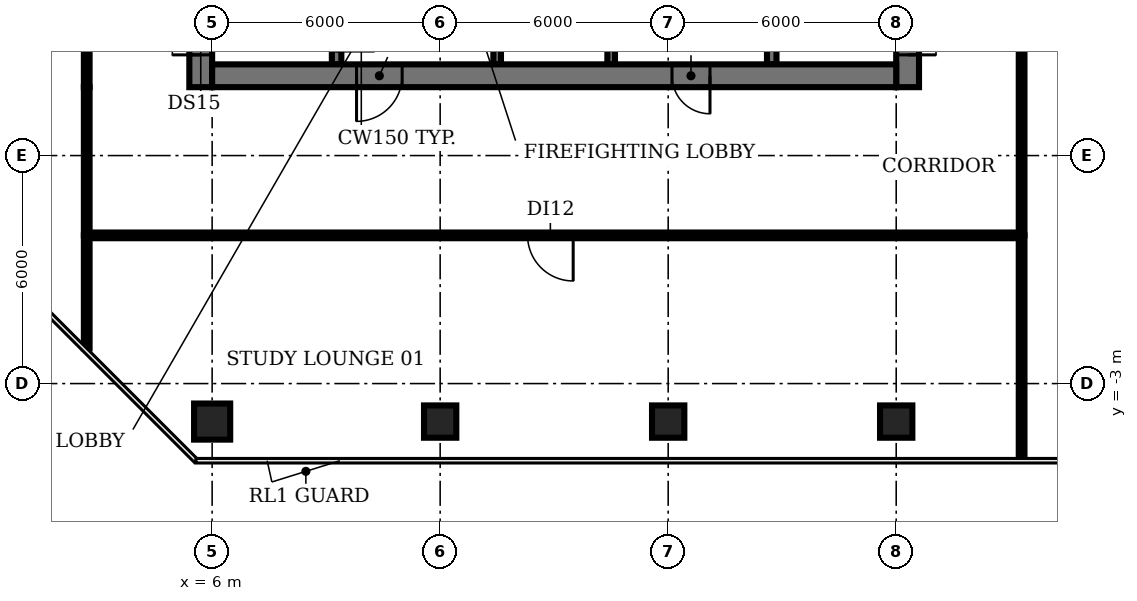
"""IFC4 building model, lengths in metres.
Left out: names, types, materials, properties, quantities, classifications, styles, units other than length and angle.
Written with IfcOpenShell. Run it as: python <this file> out.ifc"""

import sys

from ifc_helpers import new_model, si_unit, direction, frame, frame_2d, origin, origin_2d, place, context, subcontext, project, spatial, rectangle, circle, extrude, element, fill, save


model = new_model("IFC4")
c1 = context("Model", 3, precision=1e-05, world=origin(), true_north=direction((0.0, 1.0)))
c2 = subcontext(c1, "Body", "Model", "MODEL_VIEW")
j1 = project(units=[si_unit("LENGTHUNIT", "METRE"), si_unit("PLANEANGLEUNIT", "RADIAN")], contexts=[c1])
p1 = place(None, origin())
s1 = spatial("IfcSite", under=j1, at=p1, CompositionType="ELEMENT")
p2 = place(p1, origin())
s2 = spatial("IfcBuilding", under=s1, at=p2, CompositionType="ELEMENT")
p3 = place(p2, frame((0.0, 0.0, 184.4)))
s3 = spatial("IfcBuildingStorey", under=s2, at=p3, CompositionType="ELEMENT", Elevation=184.4)
p4 = place(p3, frame((6.0, -4.0, 0.0), z_axis=(0.0, 0.0, 1.0), x_axis=(1.0, 0.0, 0.0)))
e1 = element("IfcColumn", 1, at=p4, inside=s3, PredefinedType="COLUMN", context=c2, shape_type="SweptSolid", body=[
    extrude(circle(Radius=0.475, at=origin_2d()), origin(), (0.0, 0.0, 1.0), 3.85),
])
for number, where, z_axis, x_axis in (
    (2, (12.0, -4.0, 0.0), (0.0, 0.0, 1.0), (1.0, 0.0, 0.0)),
    (3, (18.0, -4.0, 0.0), (0.0, 0.0, 1.0), (1.0, 0.0, 0.0)),
    (4, (24.0, -4.0, 0.0), (0.0, 0.0, 1.0), (1.0, 0.0, 0.0)),
):
    element("IfcColumn", number, at=place(p3, frame(where, z_axis=z_axis, x_axis=x_axis)), inside=s3, PredefinedType="COLUMN", context=c2, shape_type="SweptSolid", body=[
        extrude(rectangle(XDim=0.85, YDim=0.85, at=origin_2d()), origin(), (0.0, 0.0, 1.0), 3.85),
    ])
p5 = place(p3, frame((9.275, 11.825, 0.0), z_axis=(0.0, 0.0, 1.0), x_axis=(0.0, -1.0, 0.0)))
e5 = element("IfcWall", 5, at=p5, inside=s3, PredefinedType="SHEAR", context=c2, shape_type="SweptSolid", body=[
    extrude(rectangle(XDim=6.425, YDim=0.25, at=frame_2d((3.212, 0.0))), origin(), (0.0, 0.0, 1.0), 3.85),
])
p6 = place(p5, frame((5.075, 0.0, 0.0)))
e6 = element("IfcOpeningElement", 6, at=p6, cuts=e5, PredefinedType="OPENING", context=c2, shape_type="SweptSolid", body=[
    extrude(rectangle(XDim=1.0, YDim=2.1, at=frame_2d((0.5, 1.05))), frame((0.0, 0.135, 0.0), z_axis=(0.0, -1.0, 0.0), x_axis=(1.0, 0.0, 0.0)), (0.0, 0.0, 1.0), 0.27),
])
p7 = place(p3, frame((13.5, 5.4, 0.0), z_axis=(0.0, 0.0, 1.0), x_axis=(0.0, 1.0, 0.0)))
e7 = element("IfcWall", 7, at=p7, inside=s3, PredefinedType="SHEAR", context=c2, shape_type="SweptSolid", body=[
    extrude(rectangle(XDim=8.2, YDim=0.2, at=frame_2d((4.1, 0.0))), origin(), (0.0, 0.0, 1.0), 3.85),
])
p8 = place(p7, frame((0.75, 0.0, 0.0)))
e8 = element("IfcOpeningElement", 8, at=p8, cuts=e7, PredefinedType="OPENING", context=c2, shape_type="SweptSolid", body=[
    extrude(rectangle(XDim=1.1, YDim=2.1, at=frame_2d((0.55, 1.05))), frame((0.0, 0.11, 0.0), z_axis=(0.0, -1.0, 0.0), x_axis=(1.0, 0.0, 0.0)), (0.0, 0.0, 1.0), 0.22),
])
p9 = place(p7, frame((3.55, 0.0, 0.0)))
e9 = element("IfcOpeningElement", 9, at=p9, cuts=e7, PredefinedType="OPENING", context=c2, shape_type="SweptSolid", body=[
    extrude(rectangle(XDim=1.1, YDim=2.1, at=frame_2d((0.55, 1.05))), frame((0.0, 0.11, 0.0), z_axis=(0.0, -1.0, 0.0), x_axis=(1.0, 0.0, 0.0)), (0.0, 0.0, 1.0), 0.22),
])
p10 = place(p7, frame((6.35, 0.0, 0.0)))
e10 = element("IfcOpeningElement", 10, at=p10, cuts=e7, PredefinedType="OPENING", context=c2, shape_type="SweptSolid", body=[
    extrude(rectangle(XDim=1.1, YDim=2.1, at=frame_2d((0.55, 1.05))), frame((0.0, 0.11, 0.0), z_axis=(0.0, -1.0, 0.0), x_axis=(1.0, 0.0, 0.0)), (0.0, 0.0, 1.0), 0.22),
])
p11 = place(p3, frame((16.5, 5.4, 0.0), z_axis=(0.0, 0.0, 1.0), x_axis=(0.0, 1.0, 0.0)))
e11 = element("IfcWall", 11, at=p11, inside=s3, PredefinedType="SHEAR", context=c2, shape_type="SweptSolid", body=[
    extrude(rectangle(XDim=8.2, YDim=0.2, at=frame_2d((4.1, 0.0))), origin(), (0.0, 0.0, 1.0), 3.85),
])
p12 = place(p3, frame((20.725, 5.4, 0.0), z_axis=(0.0, 0.0, 1.0), x_axis=(0.0, 1.0, 0.0)))
e12 = element("IfcWall", 12, at=p12, inside=s3, PredefinedType="SHEAR", context=c2, shape_type="SweptSolid", body=[
    extrude(rectangle(XDim=6.3, YDim=0.25, at=frame_2d((3.15, 0.0))), origin(), (0.0, 0.0, 1.0), 3.85),
])
p13 = place(p3, frame((5.7, 4.8, 0.0), z_axis=(0.0, 0.0, 1.0), x_axis=(0.0, 1.0, 0.0)))
e13 = element("IfcWall", 13, at=p13, inside=s3, PredefinedType="SHEAR", context=c2, shape_type="SweptSolid", body=[
    extrude(rectangle(XDim=20.6, YDim=0.6, at=frame_2d((10.3, 0.0))), origin(), (0.0, 0.0, 1.0), 3.85),
])
p14 = place(p13, frame((0.85, 0.0, 0.0)))
e14 = element("IfcOpeningElement", 14, at=p14, cuts=e13, PredefinedType="OPENING", context=c2, shape_type="SweptSolid", body=[
    extrude(rectangle(XDim=1.5, YDim=2.1, at=frame_2d((0.75, 1.05))), frame((0.0, 0.31, 0.0), z_axis=(0.0, -1.0, 0.0), x_axis=(1.0, 0.0, 0.0)), (0.0, 0.0, 1.0), 0.62),
])
p15 = place(p13, frame((7.3, 0.0, 0.0)))
e15 = element("IfcOpeningElement", 15, at=p15, cuts=e13, PredefinedType="OPENING", context=c2, shape_type="SweptSolid", body=[
    extrude(rectangle(XDim=1.2, YDim=2.1, at=frame_2d((0.6, 1.05))), frame((0.0, 0.31, 0.0), z_axis=(0.0, -1.0, 0.0), x_axis=(1.0, 0.0, 0.0)), (0.0, 0.0, 1.0), 0.62),
])
p16 = place(p13, frame((13.85, 0.0, 0.0)))
e16 = element("IfcOpeningElement", 16, at=p16, cuts=e13, PredefinedType="OPENING", context=c2, shape_type="SweptSolid", body=[
    extrude(rectangle(XDim=1.2, YDim=2.1, at=frame_2d((0.6, 1.05))), frame((0.0, 0.31, 0.0), z_axis=(0.0, -1.0, 0.0), x_axis=(1.0, 0.0, 0.0)), (0.0, 0.0, 1.0), 0.62),
])
p17 = place(p3, frame((24.3, 25.555, 0.0), z_axis=(0.0, 0.0, 1.0), x_axis=(0.0, -1.0, 0.0)))
e17 = element("IfcWall", 17, at=p17, inside=s3, PredefinedType="SHEAR", context=c2, shape_type="SweptSolid", body=[
    extrude(rectangle(XDim=20.755, YDim=0.6, at=frame_2d((10.377, 0.0))), origin(), (0.0, 0.0, 1.0), 3.85),
])
p18 = place(p17, frame((18.405, 0.0, 0.0)))
e18 = element("IfcOpeningElement", 18, at=p18, cuts=e17, PredefinedType="OPENING", context=c2, shape_type="SweptSolid", body=[
    extrude(rectangle(XDim=1.5, YDim=2.1, at=frame_2d((0.75, 1.05))), frame((0.0, 0.31, 0.0), z_axis=(0.0, -1.0, 0.0), x_axis=(1.0, 0.0, 0.0)), (0.0, 0.0, 1.0), 0.62),
])
p19 = place(p17, frame((12.305, 0.0, 0.0)))
e19 = element("IfcOpeningElement", 19, at=p19, cuts=e17, PredefinedType="OPENING", context=c2, shape_type="SweptSolid", body=[
    extrude(rectangle(XDim=0.9, YDim=2.1, at=frame_2d((0.45, 1.05))), frame((0.0, 0.31, 0.0), z_axis=(0.0, -1.0, 0.0), x_axis=(1.0, 0.0, 0.0)), (0.0, 0.0, 1.0), 0.62),
])
p20 = place(p17, frame((6.305, 0.0, 0.0)))
e20 = element("IfcOpeningElement", 20, at=p20, cuts=e17, PredefinedType="OPENING", context=c2, shape_type="SweptSolid", body=[
    extrude(rectangle(XDim=2.0, YDim=2.1, at=frame_2d((1.0, 1.05))), frame((0.0, 0.31, 0.0), z_axis=(0.0, -1.0, 0.0), x_axis=(1.0, 0.0, 0.0)), (0.0, 0.0, 1.0), 0.62),
])
p21 = place(p3, frame((24.0, 5.1, 0.0), z_axis=(0.0, 0.0, 1.0), x_axis=(-1.0, 0.0, 0.0)))
e21 = element("IfcWall", 21, at=p21, inside=s3, PredefinedType="SHEAR", context=c2, shape_type="SweptSolid", body=[
    extrude(rectangle(XDim=18.0, YDim=0.6, at=frame_2d((9.0, 0.0))), origin(), (0.0, 0.0, 1.0), 3.85),
])
p22 = place(p21, frame((13.0, 0.0, 0.0)))
e22 = element("IfcOpeningElement", 22, at=p22, cuts=e21, PredefinedType="OPENING", context=c2, shape_type="SweptSolid", body=[
    extrude(rectangle(XDim=1.2, YDim=2.1, at=frame_2d((0.6, 1.05))), frame((0.0, 0.31, 0.0), z_axis=(0.0, -1.0, 0.0), x_axis=(1.0, 0.0, 0.0)), (0.0, 0.0, 1.0), 0.62),
])
p23 = place(p21, frame((4.9, 0.0, 0.0)))
e23 = element("IfcOpeningElement", 23, at=p23, cuts=e21, PredefinedType="OPENING", context=c2, shape_type="SweptSolid", body=[
    extrude(rectangle(XDim=1.0, YDim=2.1, at=frame_2d((0.5, 1.05))), frame((0.0, 0.31, 0.0), z_axis=(0.0, -1.0, 0.0), x_axis=(1.0, 0.0, 0.0)), (0.0, 0.0, 1.0), 0.62),
])
p24 = place(p3, frame((2.7, -2.072, 0.0), z_axis=(0.0, 0.0, 1.0), x_axis=(0.0, 1.0, 0.0)))
e24 = element("IfcWall", 24, at=p24, inside=s3, PredefinedType="PARTITIONING", context=c2, shape_type="SweptSolid", body=[
    extrude(rectangle(XDim=2.972, YDim=0.15, at=frame_2d((1.486, 0.0))), origin(), (0.0, 0.0, 1.0), 2.88),
])
p25 = place(p3, frame((2.7, 0.9, 0.0), z_axis=(0.0, 0.0, 1.0), x_axis=(0.0, 1.0, 0.0)))
e25 = element("IfcWall", 25, at=p25, inside=s3, PredefinedType="PARTITIONING", context=c2, shape_type="SweptSolid", body=[
    extrude(rectangle(XDim=3.9, YDim=0.15, at=frame_2d((1.95, 0.0))), origin(), (0.0, 0.0, 1.0), 2.88),
])
p26 = place(p3, frame((2.7, 4.8, 0.0), z_axis=(0.0, 0.0, 1.0), x_axis=(0.0, 1.0, 0.0)))
e26 = element("IfcWall", 26, at=p26, inside=s3, PredefinedType="PARTITIONING", context=c2, shape_type="SweptSolid", body=[
    extrude(rectangle(XDim=20.6, YDim=0.15, at=frame_2d((10.3, 0.0))), origin(), (0.0, 0.0, 1.0), 2.88),
])
p27 = place(p26, frame((10.2, 0.0, 0.0)))
e27 = element("IfcOpeningElement", 27, at=p27, cuts=e26, PredefinedType="OPENING", context=c2, shape_type="SweptSolid", body=[
    extrude(rectangle(XDim=1.2, YDim=2.1, at=frame_2d((0.6, 1.05))), frame((0.0, 0.085, 0.0), z_axis=(0.0, -1.0, 0.0), x_axis=(1.0, 0.0, 0.0)), (0.0, 0.0, 1.0), 0.17),
])
p28 = place(p3, frame((27.3, -4.98, 0.0), z_axis=(0.0, 0.0, 1.0), x_axis=(0.0, 1.0, 0.0)))
e28 = element("IfcWall", 28, at=p28, inside=s3, PredefinedType="PARTITIONING", context=c2, shape_type="SweptSolid", body=[
    extrude(rectangle(XDim=5.88, YDim=0.15, at=frame_2d((2.94, 0.0))), origin(), (0.0, 0.0, 1.0), 2.88),
])
p29 = place(p3, frame((27.3, 0.9, 0.0), z_axis=(0.0, 0.0, 1.0), x_axis=(-1.0, 0.0, 0.0)))
e29 = element("IfcWall", 29, at=p29, inside=s3, PredefinedType="PARTITIONING", context=c2, shape_type="SweptSolid", body=[
    extrude(rectangle(XDim=24.6, YDim=0.15, at=frame_2d((12.3, 0.0))), origin(), (0.0, 0.0, 1.0), 2.88),
])
p30 = place(p29, frame((11.8, 0.0, 0.0)))
e30 = element("IfcOpeningElement", 30, at=p30, cuts=e29, PredefinedType="OPENING", context=c2, shape_type="SweptSolid", body=[
    extrude(rectangle(XDim=1.2, YDim=2.1, at=frame_2d((0.6, 1.05))), frame((0.0, 0.085, 0.0), z_axis=(0.0, -1.0, 0.0), x_axis=(1.0, 0.0, 0.0)), (0.0, 0.0, 1.0), 0.17),
])
p31 = place(p3, frame((27.3, 0.9, 0.0), z_axis=(0.0, 0.0, 1.0), x_axis=(0.0, 1.0, 0.0)))
e31 = element("IfcWall", 31, at=p31, inside=s3, PredefinedType="PARTITIONING", context=c2, shape_type="SweptSolid", body=[
    extrude(rectangle(XDim=13.9, YDim=0.15, at=frame_2d((6.95, 0.0))), origin(), (0.0, 0.0, 1.0), 2.88),
])
p32 = place(p14, origin())
e32 = element("IfcDoor", 32, at=p32, inside=s3, OperationType="DOUBLE_DOOR_SINGLE_SWING", PredefinedType="DOOR", context=c2, shape_type="SweptSolid", body=[
    extrude(rectangle(XDim=1.5, YDim=2.1, at=frame_2d((0.75, 1.05))), frame((0.0, 0.025, 0.0), z_axis=(0.0, -1.0, 0.0), x_axis=(1.0, 0.0, 0.0)), (0.0, 0.0, 1.0), 0.05),
])
fill(e14, e32)
p33 = place(p18, origin())
e33 = element("IfcDoor", 33, at=p33, inside=s3, OperationType="DOUBLE_DOOR_SINGLE_SWING", PredefinedType="DOOR", context=c2, shape_type="SweptSolid", body=[
    extrude(rectangle(XDim=1.5, YDim=2.1, at=frame_2d((0.75, 1.05))), frame((0.0, 0.025, 0.0), z_axis=(0.0, -1.0, 0.0), x_axis=(1.0, 0.0, 0.0)), (0.0, 0.0, 1.0), 0.05),
])
fill(e18, e33)
p34 = place(p22, origin())
e34 = element("IfcDoor", 34, at=p34, inside=s3, OperationType="SINGLE_SWING_RIGHT", PredefinedType="DOOR", context=c2, shape_type="SweptSolid", body=[
    extrude(rectangle(XDim=1.2, YDim=2.1, at=frame_2d((0.6, 1.05))), frame((0.0, 0.025, 0.0), z_axis=(0.0, -1.0, 0.0), x_axis=(1.0, 0.0, 0.0)), (0.0, 0.0, 1.0), 0.05),
])
fill(e22, e34)
p35 = place(p23, origin())
e35 = element("IfcDoor", 35, at=p35, inside=s3, OperationType="SINGLE_SWING_LEFT", PredefinedType="DOOR", context=c2, shape_type="SweptSolid", body=[
    extrude(rectangle(XDim=1.0, YDim=2.1, at=frame_2d((0.5, 1.05))), frame((0.0, -0.24, 0.0), z_axis=(0.0, -1.0, 0.0), x_axis=(1.0, 0.0, 0.0)), (0.0, 0.0, 1.0), 0.05),
])
fill(e23, e35)
p36 = place(p30, origin())
e36 = element("IfcDoor", 36, at=p36, inside=s3, OperationType="SINGLE_SWING_LEFT", PredefinedType="DOOR", context=c2, shape_type="SweptSolid", body=[
    extrude(rectangle(XDim=1.2, YDim=2.1, at=frame_2d((0.6, 1.05))), frame((0.0, 0.025, 0.0), z_axis=(0.0, -1.0, 0.0), x_axis=(1.0, 0.0, 0.0)), (0.0, 0.0, 1.0), 0.05),
])
fill(e30, e36)
save(model, sys.argv[1])
